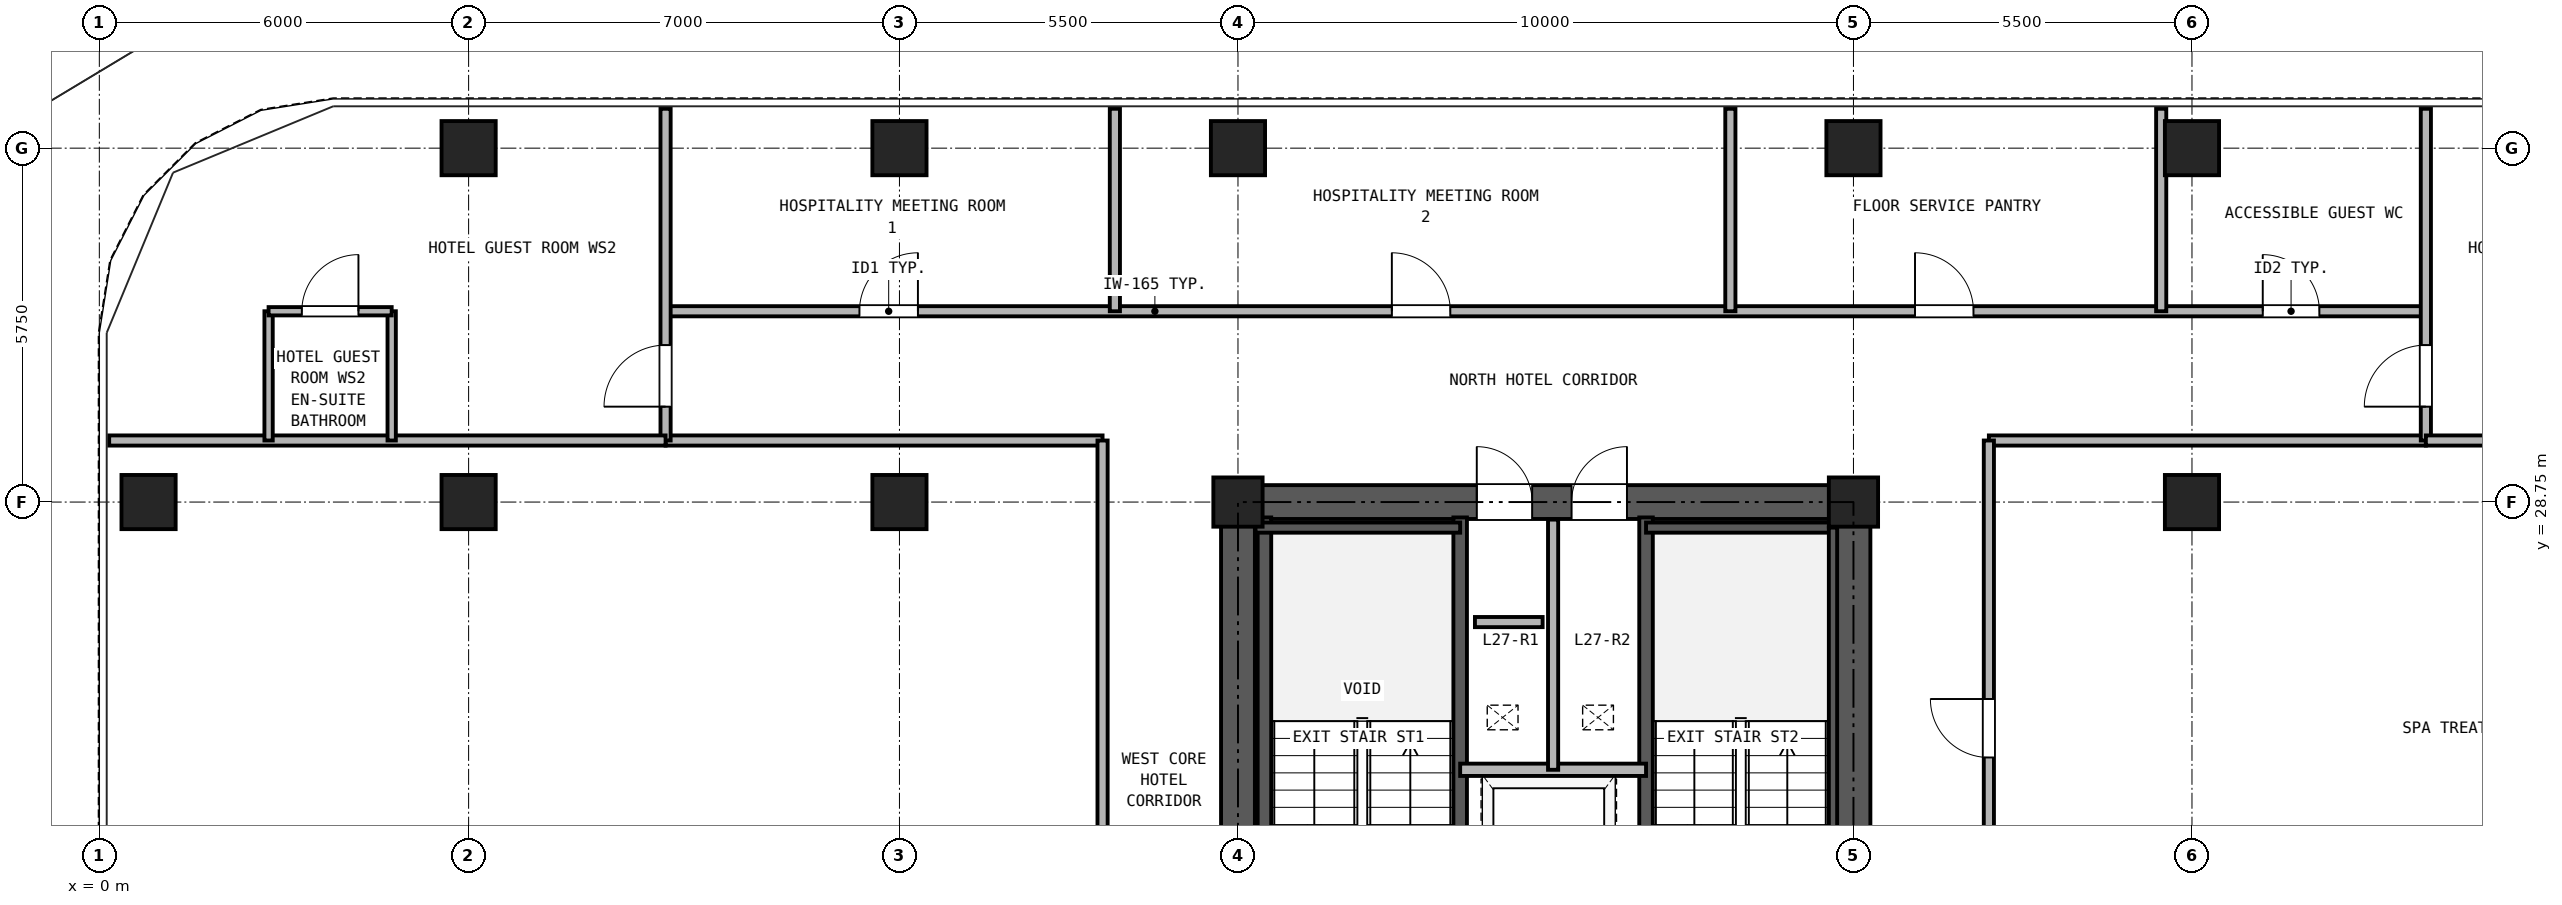
"""IFC4 building model, lengths in metres.
Left out: names, types, materials, properties, quantities, classifications, styles, units other than length and angle.
Written with IfcOpenShell. Run it as: python <this file> out.ifc"""

import sys

from ifc_helpers import new_model, si_unit, direction, frame, frame_2d, origin, origin_2d, place, context, subcontext, project, spatial, rectangle, hollow_rectangle, extrude, source, transform, mapped, element, fill, save


model = new_model("IFC4")
c1 = context("Model", 3, precision=1e-05, world=origin(), true_north=direction((0.0, 1.0)))
c2 = subcontext(c1, "Body", "Model", "MODEL_VIEW")
j1 = project(units=[si_unit("LENGTHUNIT", "METRE"), si_unit("PLANEANGLEUNIT", "RADIAN")], contexts=[c1])
p1 = place(None, origin())
s1 = spatial("IfcSite", under=j1, at=p1, CompositionType="ELEMENT")
p2 = place(p1, origin())
s2 = spatial("IfcBuilding", under=s1, at=p2, CompositionType="ELEMENT")
p3 = place(p2, frame((0.0, 0.0, 102.3)))
s3 = spatial("IfcBuildingStorey", under=s2, at=p3, CompositionType="ELEMENT", Elevation=102.3)
m1 = source(origin(), c2, "Body", "SweptSolid", [
    extrude(hollow_rectangle(XDim=0.88, YDim=0.88, WallThickness=0.05, at=origin_2d()), origin(), (0.0, 0.0, 1.0), 2.95),
])
for number, where, z_axis, x_axis in (
    (1, (6.0, 34.5, 0.0), (0.0, 0.0, 1.0), (1.0, 0.0, 0.0)),
    (2, (13.0, 34.5, 0.0), (0.0, 0.0, 1.0), (1.0, 0.0, 0.0)),
    (3, (18.5, 34.5, 0.0), (0.0, 0.0, 1.0), (1.0, 0.0, 0.0)),
    (4, (28.5, 34.5, 0.0), (0.0, 0.0, 1.0), (1.0, 0.0, 0.0)),
    (5, (34.0, 34.5, 0.0), (0.0, 0.0, 1.0), (1.0, 0.0, 0.0)),
    (6, (0.8, 28.75, 0.0), (0.0, 0.0, 1.0), (1.0, 0.0, 0.0)),
    (7, (6.0, 28.75, 0.0), (0.0, 0.0, 1.0), (1.0, 0.0, 0.0)),
    (8, (13.0, 28.75, 0.0), (0.0, 0.0, 1.0), (1.0, 0.0, 0.0)),
):
    element("IfcColumn", number, at=place(p3, frame(where, z_axis=z_axis, x_axis=x_axis)), inside=s3, PredefinedType="COLUMN", context=c2, shape_type="MappedRepresentation", body=[
        mapped(m1, transform((0.0, 0.0, 0.0), x_axis=(1.0, 0.0, 0.0), y_axis=(0.0, 1.0, 0.0), z_axis=(0.0, 0.0, 1.0), scale=1.0)),
    ])
m2 = source(origin(), c2, "Body", "SweptSolid", [
    extrude(hollow_rectangle(XDim=0.8, YDim=0.8, WallThickness=0.045, at=origin_2d()), origin(), (0.0, 0.0, 1.0), 2.95),
])
for number, where, z_axis, x_axis in (
    (9, (18.5, 28.75, 0.0), (0.0, 0.0, 1.0), (1.0, 0.0, 0.0)),
    (10, (28.5, 28.75, 0.0), (0.0, 0.0, 1.0), (1.0, 0.0, 0.0)),
):
    element("IfcColumn", number, at=place(p3, frame(where, z_axis=z_axis, x_axis=x_axis)), inside=s3, PredefinedType="COLUMN", context=c2, shape_type="MappedRepresentation", body=[
        mapped(m2, transform((0.0, 0.0, 0.0), x_axis=(1.0, 0.0, 0.0), y_axis=(0.0, 1.0, 0.0), z_axis=(0.0, 0.0, 1.0), scale=1.0)),
    ])
p4 = place(p3, frame((34.0, 28.75, 0.0), z_axis=(0.0, 0.0, 1.0), x_axis=(1.0, 0.0, 0.0)))
e11 = element("IfcColumn", 11, at=p4, inside=s3, PredefinedType="COLUMN", context=c2, shape_type="MappedRepresentation", body=[
    mapped(m1, transform((0.0, 0.0, 0.0), x_axis=(1.0, 0.0, 0.0), y_axis=(0.0, 1.0, 0.0), z_axis=(0.0, 0.0, 1.0), scale=1.0)),
])
p5 = place(p3, frame((18.225, 28.75, 0.0), z_axis=(0.0, 0.0, 1.0), x_axis=(1.0, 0.0, 0.0)))
e12 = element("IfcWall", 12, at=p5, inside=s3, PredefinedType="SHEAR", context=c2, shape_type="SweptSolid", body=[
    extrude(rectangle(XDim=10.55, YDim=0.55, at=frame_2d((5.275, 0.0))), origin(), (0.0, 0.0, 1.0), 2.95),
])
p6 = place(p5, frame((4.155, 0.0, 0.0)))
e13 = element("IfcOpeningElement", 13, at=p6, cuts=e12, PredefinedType="OPENING", context=c2, shape_type="SweptSolid", body=[
    extrude(rectangle(XDim=0.9, YDim=2.05, at=frame_2d((0.45, 1.025))), frame((0.0, 0.285, 0.0), z_axis=(0.0, -1.0, 0.0), x_axis=(1.0, 0.0, 0.0)), (0.0, 0.0, 1.0), 0.57),
])
p7 = place(p5, frame((5.695, 0.0, 0.0)))
e14 = element("IfcOpeningElement", 14, at=p7, cuts=e12, PredefinedType="OPENING", context=c2, shape_type="SweptSolid", body=[
    extrude(rectangle(XDim=0.9, YDim=2.05, at=frame_2d((0.45, 1.025))), frame((0.0, 0.285, 0.0), z_axis=(0.0, -1.0, 0.0), x_axis=(1.0, 0.0, 0.0)), (0.0, 0.0, 1.0), 0.57),
])
p8 = place(p3, frame((18.5, 11.775, 0.0), z_axis=(0.0, 0.0, 1.0), x_axis=(0.0, 1.0, 0.0)))
e15 = element("IfcWall", 15, at=p8, inside=s3, PredefinedType="SHEAR", context=c2, shape_type="SweptSolid", body=[
    extrude(rectangle(XDim=16.7, YDim=0.55, at=frame_2d((8.35, 0.0))), origin(), (0.0, 0.0, 1.0), 2.95),
])
p9 = place(p8, frame((7.375, 0.0, 0.0)))
e16 = element("IfcOpeningElement", 16, at=p9, cuts=e15, PredefinedType="OPENING", context=c2, shape_type="SweptSolid", body=[
    extrude(rectangle(XDim=1.15, YDim=2.2, at=frame_2d((0.575, 1.1))), frame((0.0, 0.285, 0.0), z_axis=(0.0, -1.0, 0.0), x_axis=(1.0, 0.0, 0.0)), (0.0, 0.0, 1.0), 0.57),
])
p10 = place(p3, frame((28.5, 11.775, 0.0), z_axis=(0.0, 0.0, 1.0), x_axis=(0.0, 1.0, 0.0)))
e17 = element("IfcWall", 17, at=p10, inside=s3, PredefinedType="SHEAR", context=c2, shape_type="SweptSolid", body=[
    extrude(rectangle(XDim=16.7, YDim=0.55, at=frame_2d((8.35, 0.0))), origin(), (0.0, 0.0, 1.0), 2.95),
])
p11 = place(p10, frame((7.375, 0.0, 0.0)))
e18 = element("IfcOpeningElement", 18, at=p11, cuts=e17, PredefinedType="OPENING", context=c2, shape_type="SweptSolid", body=[
    extrude(rectangle(XDim=1.15, YDim=2.2, at=frame_2d((0.575, 1.1))), frame((0.0, 0.285, 0.0), z_axis=(0.0, -1.0, 0.0), x_axis=(1.0, 0.0, 0.0)), (0.0, 0.0, 1.0), 0.57),
])
for number, where, z_axis, x_axis in (
    (19, (18.93, 21.39, 0.0), (0.0, 0.0, 1.0), (0.0, 1.0, 0.0)),
    (20, (22.11, 21.39, 0.0), (0.0, 0.0, 1.0), (0.0, 1.0, 0.0)),
    (21, (25.13, 21.39, 0.0), (0.0, 0.0, 1.0), (0.0, 1.0, 0.0)),
):
    element("IfcWall", number, at=place(p3, frame(where, z_axis=z_axis, x_axis=x_axis)), inside=s3, PredefinedType="SOLIDWALL", context=c2, shape_type="SweptSolid", body=[
        extrude(rectangle(XDim=7.11, YDim=0.22, at=frame_2d((3.555, 0.0))), origin(), (0.0, 0.0, 1.0), 2.95),
    ])
p12 = place(p3, frame((18.785, 28.335, 0.0), z_axis=(0.0, 0.0, 1.0), x_axis=(1.0, 0.0, 0.0)))
e22 = element("IfcWall", 22, at=p12, inside=s3, PredefinedType="PARTITIONING", context=c2, shape_type="SweptSolid", body=[
    extrude(rectangle(XDim=3.325, YDim=0.165, at=frame_2d((1.663, 0.0))), origin(), (0.0, 0.0, 1.0), 2.95),
])
p13 = place(p3, frame((25.13, 28.335, 0.0), z_axis=(0.0, 0.0, 1.0), x_axis=(1.0, 0.0, 0.0)))
e23 = element("IfcWall", 23, at=p13, inside=s3, PredefinedType="PARTITIONING", context=c2, shape_type="SweptSolid", body=[
    extrude(rectangle(XDim=3.085, YDim=0.165, at=frame_2d((1.542, 0.0))), origin(), (0.0, 0.0, 1.0), 2.95),
])
p14 = place(p3, frame((28.167, 21.39, 0.0), z_axis=(0.0, 0.0, 1.0), x_axis=(0.0, 1.0, 0.0)))
e24 = element("IfcWall", 24, at=p14, inside=s3, PredefinedType="PARTITIONING", context=c2, shape_type="SweptSolid", body=[
    extrude(rectangle(XDim=6.945, YDim=0.135, at=frame_2d((3.473, 0.0))), origin(), (0.0, 0.0, 1.0), 2.95),
])
p15 = place(p3, frame((22.11, 24.4, 0.0), z_axis=(0.0, 0.0, 1.0), x_axis=(1.0, 0.0, 0.0)))
e25 = element("IfcWall", 25, at=p15, inside=s3, PredefinedType="PARTITIONING", context=c2, shape_type="SweptSolid", body=[
    extrude(rectangle(XDim=3.02, YDim=0.2, at=frame_2d((1.51, 0.0))), origin(), (0.0, 0.0, 1.0), 2.95),
])
p16 = place(p3, frame((23.62, 24.4, 0.0), z_axis=(0.0, 0.0, 1.0), x_axis=(0.0, 1.0, 0.0)))
e26 = element("IfcWall", 26, at=p16, inside=s3, PredefinedType="PARTITIONING", context=c2, shape_type="SweptSolid", body=[
    extrude(rectangle(XDim=4.065, YDim=0.165, at=frame_2d((2.033, 0.0))), origin(), (0.0, 0.0, 1.0), 2.95),
])
p17 = place(p3, frame((9.2, 31.85, 0.0), z_axis=(0.0, 0.0, 1.0), x_axis=(1.0, 0.0, 0.0)))
e27 = element("IfcWall", 27, at=p17, inside=s3, PredefinedType="PARTITIONING", context=c2, shape_type="SweptSolid", body=[
    extrude(rectangle(XDim=28.6, YDim=0.165, at=frame_2d((14.3, 0.0))), origin(), (0.0, 0.0, 1.0), 2.583),
])
p18 = place(p17, frame((3.15, 0.0, 0.0)))
e28 = element("IfcOpeningElement", 28, at=p18, cuts=e27, PredefinedType="OPENING", context=c2, shape_type="SweptSolid", body=[
    extrude(rectangle(XDim=0.95, YDim=2.15, at=frame_2d((0.475, 1.075))), frame((0.0, 0.093, 0.0), z_axis=(0.0, -1.0, 0.0), x_axis=(1.0, 0.0, 0.0)), (0.0, 0.0, 1.0), 0.185),
])
p19 = place(p17, frame((11.8, 0.0, 0.0)))
e29 = element("IfcOpeningElement", 29, at=p19, cuts=e27, PredefinedType="OPENING", context=c2, shape_type="SweptSolid", body=[
    extrude(rectangle(XDim=0.95, YDim=2.15, at=frame_2d((0.475, 1.075))), frame((0.0, 0.093, 0.0), z_axis=(0.0, -1.0, 0.0), x_axis=(1.0, 0.0, 0.0)), (0.0, 0.0, 1.0), 0.185),
])
p20 = place(p17, frame((20.3, 0.0, 0.0)))
e30 = element("IfcOpeningElement", 30, at=p20, cuts=e27, PredefinedType="OPENING", context=c2, shape_type="SweptSolid", body=[
    extrude(rectangle(XDim=0.95, YDim=2.15, at=frame_2d((0.475, 1.075))), frame((0.0, 0.093, 0.0), z_axis=(0.0, -1.0, 0.0), x_axis=(1.0, 0.0, 0.0)), (0.0, 0.0, 1.0), 0.185),
])
p21 = place(p17, frame((25.95, 0.0, 0.0)))
e31 = element("IfcOpeningElement", 31, at=p21, cuts=e27, PredefinedType="OPENING", context=c2, shape_type="SweptSolid", body=[
    extrude(rectangle(XDim=0.92, YDim=2.1, at=frame_2d((0.46, 1.05))), frame((0.0, 0.093, 0.0), z_axis=(0.0, -1.0, 0.0), x_axis=(1.0, 0.0, 0.0)), (0.0, 0.0, 1.0), 0.185),
])
for number, where, z_axis, x_axis in (
    (32, (9.2, 29.75, 0.0), (0.0, 0.0, 1.0), (1.0, 0.0, 0.0)),
    (33, (30.7, 29.75, 0.0), (0.0, 0.0, 1.0), (1.0, 0.0, 0.0)),
):
    element("IfcWall", number, at=place(p3, frame(where, z_axis=z_axis, x_axis=x_axis)), inside=s3, PredefinedType="PARTITIONING", context=c2, shape_type="SweptSolid", body=[
        extrude(rectangle(XDim=7.1, YDim=0.165, at=frame_2d((3.55, 0.0))), origin(), (0.0, 0.0, 1.0), 2.95),
    ])
p22 = place(p3, frame((16.3, 11.15, 0.0), z_axis=(0.0, 0.0, 1.0), x_axis=(0.0, 1.0, 0.0)))
e34 = element("IfcWall", 34, at=p22, inside=s3, PredefinedType="PARTITIONING", context=c2, shape_type="SweptSolid", body=[
    extrude(rectangle(XDim=18.6, YDim=0.165, at=frame_2d((9.3, 0.0))), origin(), (0.0, 0.0, 1.0), 2.95),
])
p23 = place(p22, frame((8.8, 0.0, 0.0)))
e35 = element("IfcOpeningElement", 35, at=p23, cuts=e34, PredefinedType="OPENING", context=c2, shape_type="SweptSolid", body=[
    extrude(rectangle(XDim=0.95, YDim=2.15, at=frame_2d((0.475, 1.075))), frame((0.0, 0.093, 0.0), z_axis=(0.0, -1.0, 0.0), x_axis=(1.0, 0.0, 0.0)), (0.0, 0.0, 1.0), 0.185),
])
p24 = place(p3, frame((30.7, 11.15, 0.0), z_axis=(0.0, 0.0, 1.0), x_axis=(0.0, 1.0, 0.0)))
e36 = element("IfcWall", 36, at=p24, inside=s3, PredefinedType="PARTITIONING", context=c2, shape_type="SweptSolid", body=[
    extrude(rectangle(XDim=18.6, YDim=0.165, at=frame_2d((9.3, 0.0))), origin(), (0.0, 0.0, 1.0), 2.95),
])
p25 = place(p24, frame((4.15, 0.0, 0.0)))
e37 = element("IfcOpeningElement", 37, at=p25, cuts=e36, PredefinedType="OPENING", context=c2, shape_type="SweptSolid", body=[
    extrude(rectangle(XDim=0.95, YDim=2.15, at=frame_2d((0.475, 1.075))), frame((0.0, 0.093, 0.0), z_axis=(0.0, -1.0, 0.0), x_axis=(1.0, 0.0, 0.0)), (0.0, 0.0, 1.0), 0.185),
])
p26 = place(p24, frame((13.45, 0.0, 0.0)))
e38 = element("IfcOpeningElement", 38, at=p26, cuts=e36, PredefinedType="OPENING", context=c2, shape_type="SweptSolid", body=[
    extrude(rectangle(XDim=0.95, YDim=2.15, at=frame_2d((0.475, 1.075))), frame((0.0, 0.093, 0.0), z_axis=(0.0, -1.0, 0.0), x_axis=(1.0, 0.0, 0.0)), (0.0, 0.0, 1.0), 0.185),
])
p27 = place(p3, frame((9.2, 29.75, 0.0), z_axis=(0.0, 0.0, 1.0), x_axis=(0.0, 1.0, 0.0)))
e39 = element("IfcWall", 39, at=p27, inside=s3, PredefinedType="PARTITIONING", context=c2, shape_type="SweptSolid", body=[
    extrude(rectangle(XDim=5.39, YDim=0.165, at=frame_2d((2.695, 0.0))), origin(), (0.0, 0.0, 1.0), 2.95),
])
p28 = place(p27, frame((0.55, 0.0, 0.0)))
e40 = element("IfcOpeningElement", 40, at=p28, cuts=e39, PredefinedType="OPENING", context=c2, shape_type="SweptSolid", body=[
    extrude(rectangle(XDim=1.0, YDim=2.15, at=frame_2d((0.5, 1.075))), frame((0.0, 0.093, 0.0), z_axis=(0.0, -1.0, 0.0), x_axis=(1.0, 0.0, 0.0)), (0.0, 0.0, 1.0), 0.185),
])
p29 = place(p3, frame((37.8, 29.75, 0.0), z_axis=(0.0, 0.0, 1.0), x_axis=(0.0, 1.0, 0.0)))
e41 = element("IfcWall", 41, at=p29, inside=s3, PredefinedType="PARTITIONING", context=c2, shape_type="SweptSolid", body=[
    extrude(rectangle(XDim=5.39, YDim=0.165, at=frame_2d((2.695, 0.0))), origin(), (0.0, 0.0, 1.0), 2.95),
])
p30 = place(p29, frame((0.55, 0.0, 0.0)))
e42 = element("IfcOpeningElement", 42, at=p30, cuts=e41, PredefinedType="OPENING", context=c2, shape_type="SweptSolid", body=[
    extrude(rectangle(XDim=1.0, YDim=2.15, at=frame_2d((0.5, 1.075))), frame((0.0, 0.093, 0.0), z_axis=(0.0, -1.0, 0.0), x_axis=(1.0, 0.0, 0.0)), (0.0, 0.0, 1.0), 0.185),
])
for number, where, z_axis, x_axis in (
    (43, (0.16, 29.75, 0.0), (0.0, 0.0, 1.0), (1.0, 0.0, 0.0)),
    (44, (37.8, 29.75, 0.0), (0.0, 0.0, 1.0), (1.0, 0.0, 0.0)),
):
    element("IfcWall", number, at=place(p3, frame(where, z_axis=z_axis, x_axis=x_axis)), inside=s3, PredefinedType="PARTITIONING", context=c2, shape_type="SweptSolid", body=[
        extrude(rectangle(XDim=9.04, YDim=0.165, at=frame_2d((4.52, 0.0))), origin(), (0.0, 0.0, 1.0), 2.95),
    ])
for number, where, z_axis, x_axis in (
    (45, (2.75, 29.75, 0.0), (0.0, 0.0, 1.0), (0.0, 1.0, 0.0)),
    (46, (4.75, 29.75, 0.0), (0.0, 0.0, 1.0), (0.0, 1.0, 0.0)),
):
    element("IfcWall", number, at=place(p3, frame(where, z_axis=z_axis, x_axis=x_axis)), inside=s3, PredefinedType="PARTITIONING", context=c2, shape_type="SweptSolid", body=[
        extrude(rectangle(XDim=2.1, YDim=0.135, at=frame_2d((1.05, 0.0))), origin(), (0.0, 0.0, 1.0), 2.95),
    ])
p31 = place(p3, frame((2.75, 31.85, 0.0), z_axis=(0.0, 0.0, 1.0), x_axis=(1.0, 0.0, 0.0)))
e47 = element("IfcWall", 47, at=p31, inside=s3, PredefinedType="PARTITIONING", context=c2, shape_type="SweptSolid", body=[
    extrude(rectangle(XDim=2.0, YDim=0.135, at=frame_2d((1.0, 0.0))), origin(), (0.0, 0.0, 1.0), 2.95),
])
p32 = place(p31, frame((0.54, 0.0, 0.0)))
e48 = element("IfcOpeningElement", 48, at=p32, cuts=e47, PredefinedType="OPENING", context=c2, shape_type="SweptSolid", body=[
    extrude(rectangle(XDim=0.92, YDim=2.1, at=frame_2d((0.46, 1.05))), frame((0.0, 0.077, 0.0), z_axis=(0.0, -1.0, 0.0), x_axis=(1.0, 0.0, 0.0)), (0.0, 0.0, 1.0), 0.155),
])
for number, where, z_axis, x_axis in (
    (49, (16.5, 31.85, 0.0), (0.0, 0.0, 1.0), (0.0, 1.0, 0.0)),
    (50, (26.5, 31.85, 0.0), (0.0, 0.0, 1.0), (0.0, 1.0, 0.0)),
    (51, (33.5, 31.85, 0.0), (0.0, 0.0, 1.0), (0.0, 1.0, 0.0)),
):
    element("IfcWall", number, at=place(p3, frame(where, z_axis=z_axis, x_axis=x_axis)), inside=s3, PredefinedType="PARTITIONING", context=c2, shape_type="SweptSolid", body=[
        extrude(rectangle(XDim=3.29, YDim=0.165, at=frame_2d((1.645, 0.0))), origin(), (0.0, 0.0, 1.0), 2.95),
    ])
p33 = place(p3, frame((22.35, 26.8, 0.0), z_axis=(0.0, 0.0, 1.0), x_axis=(1.0, 0.0, 0.0)))
e52 = element("IfcWall", 52, at=p33, inside=s3, PredefinedType="PARTITIONING", context=c2, shape_type="SweptSolid", body=[
    extrude(rectangle(XDim=1.1, YDim=0.165, at=frame_2d((0.55, 0.0))), origin(), (0.0, 0.0, 1.0), 2.95),
])
p34 = place(p6, origin())
e53 = element("IfcDoor", 53, at=p34, inside=s3, OperationType="SINGLE_SWING_LEFT", PredefinedType="DOOR", context=c2, shape_type="SweptSolid", body=[
    extrude(rectangle(XDim=0.9, YDim=2.05, at=frame_2d((0.45, 1.025))), frame((0.0, 0.025, 0.0), z_axis=(0.0, -1.0, 0.0), x_axis=(1.0, 0.0, 0.0)), (0.0, 0.0, 1.0), 0.05),
])
fill(e13, e53)
p35 = place(p7, origin())
e54 = element("IfcDoor", 54, at=p35, inside=s3, OperationType="SINGLE_SWING_RIGHT", PredefinedType="DOOR", context=c2, shape_type="SweptSolid", body=[
    extrude(rectangle(XDim=0.9, YDim=2.05, at=frame_2d((0.45, 1.025))), frame((0.0, 0.025, 0.0), z_axis=(0.0, -1.0, 0.0), x_axis=(1.0, 0.0, 0.0)), (0.0, 0.0, 1.0), 0.05),
])
fill(e14, e54)
p36 = place(p32, frame((0.92, 0.0, 0.0), z_axis=(0.0, 0.0, 1.0), x_axis=(-1.0, 0.0, 0.0)))
e55 = element("IfcDoor", 55, at=p36, inside=s3, OperationType="SINGLE_SWING_RIGHT", PredefinedType="DOOR", context=c2, shape_type="SweptSolid", body=[
    extrude(rectangle(XDim=0.92, YDim=2.1, at=frame_2d((0.46, 1.05))), frame((0.0, 0.025, 0.0), z_axis=(0.0, -1.0, 0.0), x_axis=(1.0, 0.0, 0.0)), (0.0, 0.0, 1.0), 0.05),
])
fill(e48, e55)
p37 = place(p28, origin())
e56 = element("IfcDoor", 56, at=p37, inside=s3, OperationType="SINGLE_SWING_LEFT", PredefinedType="DOOR", context=c2, shape_type="SweptSolid", body=[
    extrude(rectangle(XDim=1.0, YDim=2.15, at=frame_2d((0.5, 1.075))), frame((0.0, 0.025, 0.0), z_axis=(0.0, -1.0, 0.0), x_axis=(1.0, 0.0, 0.0)), (0.0, 0.0, 1.0), 0.05),
])
fill(e40, e56)
p38 = place(p30, frame((1.0, 0.0, 0.0), z_axis=(0.0, 0.0, 1.0), x_axis=(-1.0, 0.0, 0.0)))
e57 = element("IfcDoor", 57, at=p38, inside=s3, OperationType="SINGLE_SWING_LEFT", PredefinedType="DOOR", context=c2, shape_type="SweptSolid", body=[
    extrude(rectangle(XDim=1.0, YDim=2.15, at=frame_2d((0.5, 1.075))), frame((0.0, 0.025, 0.0), z_axis=(0.0, -1.0, 0.0), x_axis=(1.0, 0.0, 0.0)), (0.0, 0.0, 1.0), 0.05),
])
fill(e42, e57)
p39 = place(p18, origin())
e58 = element("IfcDoor", 58, at=p39, inside=s3, OperationType="SINGLE_SWING_RIGHT", PredefinedType="DOOR", context=c2, shape_type="SweptSolid", body=[
    extrude(rectangle(XDim=0.95, YDim=2.15, at=frame_2d((0.475, 1.075))), frame((0.0, 0.025, 0.0), z_axis=(0.0, -1.0, 0.0), x_axis=(1.0, 0.0, 0.0)), (0.0, 0.0, 1.0), 0.05),
])
fill(e28, e58)
p40 = place(p19, origin())
e59 = element("IfcDoor", 59, at=p40, inside=s3, OperationType="SINGLE_SWING_LEFT", PredefinedType="DOOR", context=c2, shape_type="SweptSolid", body=[
    extrude(rectangle(XDim=0.95, YDim=2.15, at=frame_2d((0.475, 1.075))), frame((0.0, 0.025, 0.0), z_axis=(0.0, -1.0, 0.0), x_axis=(1.0, 0.0, 0.0)), (0.0, 0.0, 1.0), 0.05),
])
fill(e29, e59)
p41 = place(p20, origin())
e60 = element("IfcDoor", 60, at=p41, inside=s3, OperationType="SINGLE_SWING_LEFT", PredefinedType="DOOR", context=c2, shape_type="SweptSolid", body=[
    extrude(rectangle(XDim=0.95, YDim=2.15, at=frame_2d((0.475, 1.075))), frame((0.0, 0.025, 0.0), z_axis=(0.0, -1.0, 0.0), x_axis=(1.0, 0.0, 0.0)), (0.0, 0.0, 1.0), 0.05),
])
fill(e30, e60)
p42 = place(p21, origin())
e61 = element("IfcDoor", 61, at=p42, inside=s3, OperationType="SINGLE_SWING_LEFT", PredefinedType="DOOR", context=c2, shape_type="SweptSolid", body=[
    extrude(rectangle(XDim=0.92, YDim=2.1, at=frame_2d((0.46, 1.05))), frame((0.0, 0.025, 0.0), z_axis=(0.0, -1.0, 0.0), x_axis=(1.0, 0.0, 0.0)), (0.0, 0.0, 1.0), 0.05),
])
fill(e31, e61)
p43 = place(p26, origin())
e62 = element("IfcDoor", 62, at=p43, inside=s3, OperationType="SINGLE_SWING_RIGHT", PredefinedType="DOOR", context=c2, shape_type="SweptSolid", body=[
    extrude(rectangle(XDim=0.95, YDim=2.15, at=frame_2d((0.475, 1.075))), frame((0.0, 0.025, 0.0), z_axis=(0.0, -1.0, 0.0), x_axis=(1.0, 0.0, 0.0)), (0.0, 0.0, 1.0), 0.05),
])
fill(e38, e62)
save(model, sys.argv[1])
